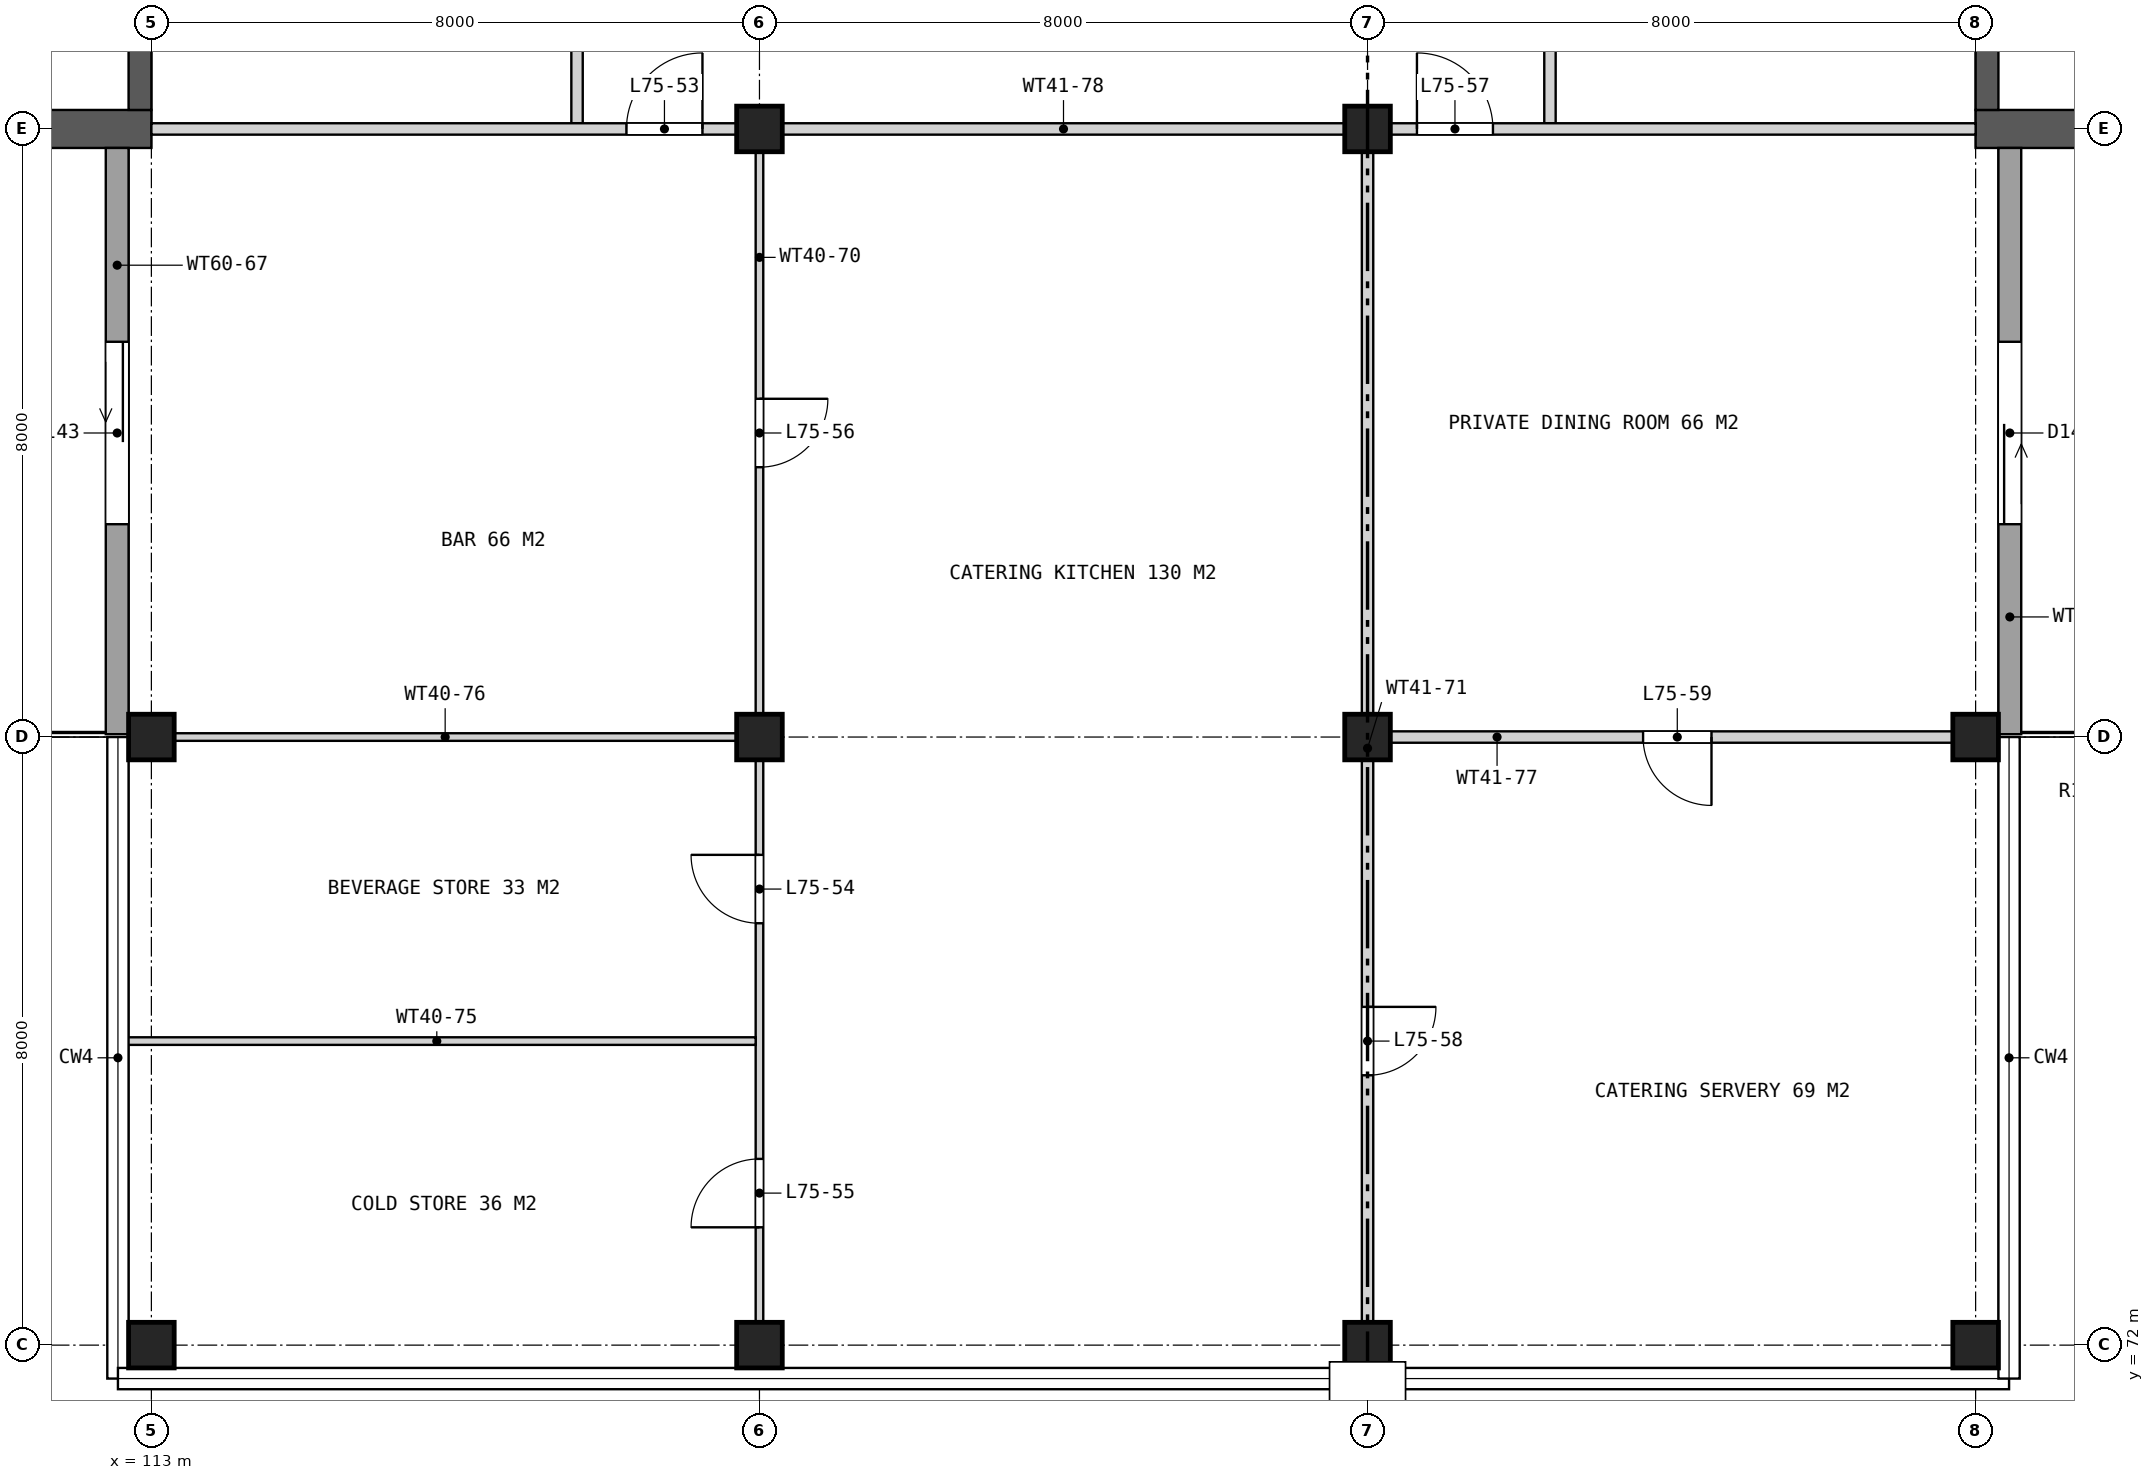
"""IFC4 building model, lengths in metres.
Left out: names, types, materials, properties, quantities, classifications, styles, units other than length and angle.
Written with IfcOpenShell. Run it as: python <this file> out.ifc"""

import sys

from ifc_helpers import new_model, si_unit, direction, frame, frame_2d, origin, origin_2d, place, context, subcontext, project, spatial, rectangle, extrude, element, fill, save


model = new_model("IFC4")
c1 = context("Model", 3, precision=1e-05, world=origin(), true_north=direction((0.0, 1.0)))
c2 = subcontext(c1, "Body", "Model", "MODEL_VIEW")
j1 = project(units=[si_unit("LENGTHUNIT", "METRE"), si_unit("PLANEANGLEUNIT", "RADIAN")], contexts=[c1])
p1 = place(None, origin())
s1 = spatial("IfcSite", under=j1, at=p1, CompositionType="ELEMENT")
p2 = place(p1, origin())
s2 = spatial("IfcBuilding", under=s1, at=p2, CompositionType="ELEMENT")
p3 = place(p2, frame((0.0, 0.0, 344.9)))
s3 = spatial("IfcBuildingStorey", under=s2, at=p3, CompositionType="ELEMENT", Elevation=344.9)
for number, where, z_axis, x_axis in (
    (1, (113.0, 72.0, 0.0), (0.0, 0.0, 1.0), (1.0, 0.0, 0.0)),
    (2, (113.0, 80.0, 0.0), (0.0, 0.0, 1.0), (1.0, 0.0, 0.0)),
    (3, (121.0, 72.0, 0.0), (0.0, 0.0, 1.0), (1.0, 0.0, 0.0)),
    (4, (121.0, 80.0, 0.0), (0.0, 0.0, 1.0), (1.0, 0.0, 0.0)),
    (5, (121.0, 88.0, 0.0), (0.0, 0.0, 1.0), (1.0, 0.0, 0.0)),
    (6, (129.0, 72.0, 0.0), (0.0, 0.0, 1.0), (1.0, 0.0, 0.0)),
    (7, (129.0, 80.0, 0.0), (0.0, 0.0, 1.0), (1.0, 0.0, 0.0)),
    (8, (129.0, 88.0, 0.0), (0.0, 0.0, 1.0), (1.0, 0.0, 0.0)),
    (9, (137.0, 72.0, 0.0), (0.0, 0.0, 1.0), (1.0, 0.0, 0.0)),
    (10, (137.0, 80.0, 0.0), (0.0, 0.0, 1.0), (1.0, 0.0, 0.0)),
):
    element("IfcColumn", number, at=place(p3, frame(where, z_axis=z_axis, x_axis=x_axis)), inside=s3, PredefinedType="COLUMN", context=c2, shape_type="SweptSolid", body=[
        extrude(rectangle(XDim=0.6, YDim=0.6, at=origin_2d()), origin(), (0.0, 0.0, 1.0), 4.2),
    ])
p4 = place(p3, frame((137.0, 88.0, 0.0), z_axis=(0.0, 0.0, 1.0), x_axis=(1.0, 0.0, 0.0)))
e11 = element("IfcWall", 11, at=p4, inside=s3, PredefinedType="SHEAR", context=c2, shape_type="SweptSolid", body=[
    extrude(rectangle(XDim=7.1, YDim=0.5, at=frame_2d((3.55, 0.0))), origin(), (0.0, 0.0, 1.0), 4.2),
])
p5 = place(p3, frame((137.15, 88.25, 0.0), z_axis=(0.0, 0.0, 1.0), x_axis=(0.0, 1.0, 0.0)))
e12 = element("IfcWall", 12, at=p5, inside=s3, PredefinedType="SHEAR", context=c2, shape_type="SweptSolid", body=[
    extrude(rectangle(XDim=6.05, YDim=0.3, at=frame_2d((3.025, 0.0))), origin(), (0.0, 0.0, 1.0), 4.2),
])
p6 = place(p3, frame((113.0, 88.0, 0.0), z_axis=(0.0, 0.0, 1.0), x_axis=(-1.0, 0.0, 0.0)))
e13 = element("IfcWall", 13, at=p6, inside=s3, PredefinedType="SHEAR", context=c2, shape_type="SweptSolid", body=[
    extrude(rectangle(XDim=7.1, YDim=0.5, at=frame_2d((3.55, 0.0))), origin(), (0.0, 0.0, 1.0), 4.2),
])
p7 = place(p3, frame((112.85, 94.3, 0.0), z_axis=(0.0, 0.0, 1.0), x_axis=(0.0, -1.0, 0.0)))
e14 = element("IfcWall", 14, at=p7, inside=s3, PredefinedType="SHEAR", context=c2, shape_type="SweptSolid", body=[
    extrude(rectangle(XDim=6.05, YDim=0.3, at=frame_2d((3.025, 0.0))), origin(), (0.0, 0.0, 1.0), 4.2),
])
p8 = place(p3, frame((112.55, 87.75, 0.0), z_axis=(0.0, 0.0, 1.0), x_axis=(0.0, -1.0, 0.0)))
e15 = element("IfcWall", 15, at=p8, inside=s3, PredefinedType="SOLIDWALL", context=c2, shape_type="SweptSolid", body=[
    extrude(rectangle(XDim=7.712, YDim=0.3, at=frame_2d((3.856, 0.0))), origin(), (0.0, 0.0, 1.0), 3.85),
])
p9 = place(p8, frame((2.55, 0.0, 0.0)))
e16 = element("IfcOpeningElement", 16, at=p9, cuts=e15, PredefinedType="OPENING", context=c2, shape_type="SweptSolid", body=[
    extrude(rectangle(XDim=2.4, YDim=2.4, at=frame_2d((1.2, 1.2))), frame((0.0, 0.16, 0.0), z_axis=(0.0, -1.0, 0.0), x_axis=(1.0, 0.0, 0.0)), (0.0, 0.0, 1.0), 0.32),
])
p10 = place(p3, frame((137.45, 80.038, 0.0), z_axis=(0.0, 0.0, 1.0), x_axis=(0.0, 1.0, 0.0)))
e17 = element("IfcWall", 17, at=p10, inside=s3, PredefinedType="SOLIDWALL", context=c2, shape_type="SweptSolid", body=[
    extrude(rectangle(XDim=7.712, YDim=0.3, at=frame_2d((3.856, 0.0))), origin(), (0.0, 0.0, 1.0), 3.85),
])
p11 = place(p10, frame((2.762, 0.0, 0.0)))
e18 = element("IfcOpeningElement", 18, at=p11, cuts=e17, PredefinedType="OPENING", context=c2, shape_type="SweptSolid", body=[
    extrude(rectangle(XDim=2.4, YDim=2.4, at=frame_2d((1.2, 1.2))), frame((0.0, 0.16, 0.0), z_axis=(0.0, -1.0, 0.0), x_axis=(1.0, 0.0, 0.0)), (0.0, 0.0, 1.0), 0.32),
])
p12 = place(p3, frame((118.6, 88.075, 0.0), z_axis=(0.0, 0.0, 1.0), x_axis=(0.0, 1.0, 0.0)))
e19 = element("IfcWall", 19, at=p12, inside=s3, PredefinedType="PARTITIONING", context=c2, shape_type="SweptSolid", body=[
    extrude(rectangle(XDim=5.925, YDim=0.15, at=frame_2d((2.962, 0.0))), origin(), (0.0, 0.0, 1.0), 3.396),
])
p13 = place(p12, frame((2.45, 0.0, 0.0)))
e20 = element("IfcOpeningElement", 20, at=p13, cuts=e19, PredefinedType="OPENING", context=c2, shape_type="SweptSolid", body=[
    extrude(rectangle(XDim=1.0, YDim=2.1, at=frame_2d((0.5, 1.05))), frame((0.0, 0.085, 0.0), z_axis=(0.0, -1.0, 0.0), x_axis=(1.0, 0.0, 0.0)), (0.0, 0.0, 1.0), 0.17),
])
p14 = place(p3, frame((121.0, 71.78, 0.0), z_axis=(0.0, 0.0, 1.0), x_axis=(0.0, 1.0, 0.0)))
e21 = element("IfcWall", 21, at=p14, inside=s3, PredefinedType="PARTITIONING", context=c2, shape_type="SweptSolid", body=[
    extrude(rectangle(XDim=16.145, YDim=0.1, at=frame_2d((8.073, 0.0))), origin(), (0.0, 0.0, 1.0), 3.396),
])
p15 = place(p14, frame((5.77, 0.0, 0.0)))
e22 = element("IfcOpeningElement", 22, at=p15, cuts=e21, PredefinedType="OPENING", context=c2, shape_type="SweptSolid", body=[
    extrude(rectangle(XDim=0.9, YDim=2.1, at=frame_2d((0.45, 1.05))), frame((0.0, 0.06, 0.0), z_axis=(0.0, -1.0, 0.0), x_axis=(1.0, 0.0, 0.0)), (0.0, 0.0, 1.0), 0.12),
])
p16 = place(p14, frame((1.77, 0.0, 0.0)))
e23 = element("IfcOpeningElement", 23, at=p16, cuts=e21, PredefinedType="OPENING", context=c2, shape_type="SweptSolid", body=[
    extrude(rectangle(XDim=0.9, YDim=2.1, at=frame_2d((0.45, 1.05))), frame((0.0, 0.06, 0.0), z_axis=(0.0, -1.0, 0.0), x_axis=(1.0, 0.0, 0.0)), (0.0, 0.0, 1.0), 0.12),
])
p17 = place(p14, frame((11.77, 0.0, 0.0)))
e24 = element("IfcOpeningElement", 24, at=p17, cuts=e21, PredefinedType="OPENING", context=c2, shape_type="SweptSolid", body=[
    extrude(rectangle(XDim=0.9, YDim=2.1, at=frame_2d((0.45, 1.05))), frame((0.0, 0.06, 0.0), z_axis=(0.0, -1.0, 0.0), x_axis=(1.0, 0.0, 0.0)), (0.0, 0.0, 1.0), 0.12),
])
p18 = place(p3, frame((129.0, 71.78, 0.0), z_axis=(0.0, 0.0, 1.0), x_axis=(0.0, 1.0, 0.0)))
e25 = element("IfcWall", 25, at=p18, inside=s3, PredefinedType="PARTITIONING", context=c2, shape_type="SweptSolid", body=[
    extrude(rectangle(XDim=16.145, YDim=0.15, at=frame_2d((8.073, 0.0))), origin(), (0.0, 0.0, 1.0), 3.396),
])
p19 = place(p18, frame((3.77, 0.0, 0.0)))
e26 = element("IfcOpeningElement", 26, at=p19, cuts=e25, PredefinedType="OPENING", context=c2, shape_type="SweptSolid", body=[
    extrude(rectangle(XDim=0.9, YDim=2.1, at=frame_2d((0.45, 1.05))), frame((0.0, 0.085, 0.0), z_axis=(0.0, -1.0, 0.0), x_axis=(1.0, 0.0, 0.0)), (0.0, 0.0, 1.0), 0.17),
])
p20 = place(p3, frame((131.4, 88.075, 0.0), z_axis=(0.0, 0.0, 1.0), x_axis=(0.0, 1.0, 0.0)))
e27 = element("IfcWall", 27, at=p20, inside=s3, PredefinedType="PARTITIONING", context=c2, shape_type="SweptSolid", body=[
    extrude(rectangle(XDim=5.925, YDim=0.15, at=frame_2d((2.962, 0.0))), origin(), (0.0, 0.0, 1.0), 3.396),
])
p21 = place(p20, frame((2.45, 0.0, 0.0)))
e28 = element("IfcOpeningElement", 28, at=p21, cuts=e27, PredefinedType="OPENING", context=c2, shape_type="SweptSolid", body=[
    extrude(rectangle(XDim=1.0, YDim=2.1, at=frame_2d((0.5, 1.05))), frame((0.0, 0.085, 0.0), z_axis=(0.0, -1.0, 0.0), x_axis=(1.0, 0.0, 0.0)), (0.0, 0.0, 1.0), 0.17),
])
p22 = place(p3, frame((112.56, 76.0, 0.0), z_axis=(0.0, 0.0, 1.0), x_axis=(1.0, 0.0, 0.0)))
e29 = element("IfcWall", 29, at=p22, inside=s3, PredefinedType="PARTITIONING", context=c2, shape_type="SweptSolid", body=[
    extrude(rectangle(XDim=8.39, YDim=0.1, at=frame_2d((4.195, 0.0))), origin(), (0.0, 0.0, 1.0), 3.396),
])
p23 = place(p3, frame((112.78, 80.0, 0.0), z_axis=(0.0, 0.0, 1.0), x_axis=(1.0, 0.0, 0.0)))
e30 = element("IfcWall", 30, at=p23, inside=s3, PredefinedType="PARTITIONING", context=c2, shape_type="SweptSolid", body=[
    extrude(rectangle(XDim=8.17, YDim=0.1, at=frame_2d((4.085, 0.0))), origin(), (0.0, 0.0, 1.0), 3.396),
])
p24 = place(p3, frame((129.075, 80.0, 0.0), z_axis=(0.0, 0.0, 1.0), x_axis=(1.0, 0.0, 0.0)))
e31 = element("IfcWall", 31, at=p24, inside=s3, PredefinedType="PARTITIONING", context=c2, shape_type="SweptSolid", body=[
    extrude(rectangle(XDim=8.145, YDim=0.15, at=frame_2d((4.073, 0.0))), origin(), (0.0, 0.0, 1.0), 3.396),
])
p25 = place(p24, frame((3.55, 0.0, 0.0)))
e32 = element("IfcOpeningElement", 32, at=p25, cuts=e31, PredefinedType="OPENING", context=c2, shape_type="SweptSolid", body=[
    extrude(rectangle(XDim=0.9, YDim=2.1, at=frame_2d((0.45, 1.05))), frame((0.0, 0.085, 0.0), z_axis=(0.0, -1.0, 0.0), x_axis=(1.0, 0.0, 0.0)), (0.0, 0.0, 1.0), 0.17),
])
p26 = place(p3, frame((113.0, 88.0, 0.0), z_axis=(0.0, 0.0, 1.0), x_axis=(1.0, 0.0, 0.0)))
e33 = element("IfcWall", 33, at=p26, inside=s3, PredefinedType="PARTITIONING", context=c2, shape_type="SweptSolid", body=[
    extrude(rectangle(XDim=24.0, YDim=0.15, at=frame_2d((12.0, 0.0))), origin(), (0.0, 0.0, 1.0), 3.396),
])
p27 = place(p26, frame((6.25, 0.0, 0.0)))
e34 = element("IfcOpeningElement", 34, at=p27, cuts=e33, PredefinedType="OPENING", context=c2, shape_type="SweptSolid", body=[
    extrude(rectangle(XDim=1.0, YDim=2.1, at=frame_2d((0.5, 1.05))), frame((0.0, 0.085, 0.0), z_axis=(0.0, -1.0, 0.0), x_axis=(1.0, 0.0, 0.0)), (0.0, 0.0, 1.0), 0.17),
])
p28 = place(p26, frame((16.65, 0.0, 0.0)))
e35 = element("IfcOpeningElement", 35, at=p28, cuts=e33, PredefinedType="OPENING", context=c2, shape_type="SweptSolid", body=[
    extrude(rectangle(XDim=1.0, YDim=2.1, at=frame_2d((0.5, 1.05))), frame((0.0, 0.085, 0.0), z_axis=(0.0, -1.0, 0.0), x_axis=(1.0, 0.0, 0.0)), (0.0, 0.0, 1.0), 0.17),
])
p29 = place(p9, frame((2.4, 0.0, 0.0), z_axis=(0.0, 0.0, 1.0), x_axis=(-1.0, 0.0, 0.0)))
e36 = element("IfcDoor", 36, at=p29, inside=s3, OperationType="SLIDING_TO_LEFT", PredefinedType="DOOR", context=c2, shape_type="SweptSolid", body=[
    extrude(rectangle(XDim=2.4, YDim=2.4, at=frame_2d((1.2, 1.2))), frame((0.0, 0.025, 0.0), z_axis=(0.0, -1.0, 0.0), x_axis=(1.0, 0.0, 0.0)), (0.0, 0.0, 1.0), 0.05),
])
fill(e16, e36)
p30 = place(p11, frame((2.4, 0.0, 0.0), z_axis=(0.0, 0.0, 1.0), x_axis=(-1.0, 0.0, 0.0)))
e37 = element("IfcDoor", 37, at=p30, inside=s3, OperationType="SLIDING_TO_LEFT", PredefinedType="DOOR", context=c2, shape_type="SweptSolid", body=[
    extrude(rectangle(XDim=2.4, YDim=2.4, at=frame_2d((1.2, 1.2))), frame((0.0, 0.025, 0.0), z_axis=(0.0, -1.0, 0.0), x_axis=(1.0, 0.0, 0.0)), (0.0, 0.0, 1.0), 0.05),
])
fill(e18, e37)
p31 = place(p27, origin())
e38 = element("IfcDoor", 38, at=p31, inside=s3, OperationType="SINGLE_SWING_RIGHT", PredefinedType="DOOR", context=c2, shape_type="SweptSolid", body=[
    extrude(rectangle(XDim=1.0, YDim=2.1, at=frame_2d((0.5, 1.05))), frame((0.0, 0.025, 0.0), z_axis=(0.0, -1.0, 0.0), x_axis=(1.0, 0.0, 0.0)), (0.0, 0.0, 1.0), 0.05),
])
fill(e34, e38)
p32 = place(p15, origin())
e39 = element("IfcDoor", 39, at=p32, inside=s3, OperationType="SINGLE_SWING_RIGHT", PredefinedType="DOOR", context=c2, shape_type="SweptSolid", body=[
    extrude(rectangle(XDim=0.9, YDim=2.1, at=frame_2d((0.45, 1.05))), frame((0.0, 0.025, 0.0), z_axis=(0.0, -1.0, 0.0), x_axis=(1.0, 0.0, 0.0)), (0.0, 0.0, 1.0), 0.05),
])
fill(e22, e39)
p33 = place(p16, origin())
e40 = element("IfcDoor", 40, at=p33, inside=s3, OperationType="SINGLE_SWING_LEFT", PredefinedType="DOOR", context=c2, shape_type="SweptSolid", body=[
    extrude(rectangle(XDim=0.9, YDim=2.1, at=frame_2d((0.45, 1.05))), frame((0.0, 0.025, 0.0), z_axis=(0.0, -1.0, 0.0), x_axis=(1.0, 0.0, 0.0)), (0.0, 0.0, 1.0), 0.05),
])
fill(e23, e40)
p34 = place(p17, frame((0.9, 0.0, 0.0), z_axis=(0.0, 0.0, 1.0), x_axis=(-1.0, 0.0, 0.0)))
e41 = element("IfcDoor", 41, at=p34, inside=s3, OperationType="SINGLE_SWING_LEFT", PredefinedType="DOOR", context=c2, shape_type="SweptSolid", body=[
    extrude(rectangle(XDim=0.9, YDim=2.1, at=frame_2d((0.45, 1.05))), frame((0.0, 0.025, 0.0), z_axis=(0.0, -1.0, 0.0), x_axis=(1.0, 0.0, 0.0)), (0.0, 0.0, 1.0), 0.05),
])
fill(e24, e41)
p35 = place(p28, origin())
e42 = element("IfcDoor", 42, at=p35, inside=s3, OperationType="SINGLE_SWING_LEFT", PredefinedType="DOOR", context=c2, shape_type="SweptSolid", body=[
    extrude(rectangle(XDim=1.0, YDim=2.1, at=frame_2d((0.5, 1.05))), frame((0.0, 0.025, 0.0), z_axis=(0.0, -1.0, 0.0), x_axis=(1.0, 0.0, 0.0)), (0.0, 0.0, 1.0), 0.05),
])
fill(e35, e42)
p36 = place(p19, frame((0.9, 0.0, 0.0), z_axis=(0.0, 0.0, 1.0), x_axis=(-1.0, 0.0, 0.0)))
e43 = element("IfcDoor", 43, at=p36, inside=s3, OperationType="SINGLE_SWING_LEFT", PredefinedType="DOOR", context=c2, shape_type="SweptSolid", body=[
    extrude(rectangle(XDim=0.9, YDim=2.1, at=frame_2d((0.45, 1.05))), frame((0.0, 0.025, 0.0), z_axis=(0.0, -1.0, 0.0), x_axis=(1.0, 0.0, 0.0)), (0.0, 0.0, 1.0), 0.05),
])
fill(e26, e43)
p37 = place(p25, frame((0.9, 0.0, 0.0), z_axis=(0.0, 0.0, 1.0), x_axis=(-1.0, 0.0, 0.0)))
e44 = element("IfcDoor", 44, at=p37, inside=s3, OperationType="SINGLE_SWING_LEFT", PredefinedType="DOOR", context=c2, shape_type="SweptSolid", body=[
    extrude(rectangle(XDim=0.9, YDim=2.1, at=frame_2d((0.45, 1.05))), frame((0.0, 0.025, 0.0), z_axis=(0.0, -1.0, 0.0), x_axis=(1.0, 0.0, 0.0)), (0.0, 0.0, 1.0), 0.05),
])
fill(e32, e44)
save(model, sys.argv[1])
